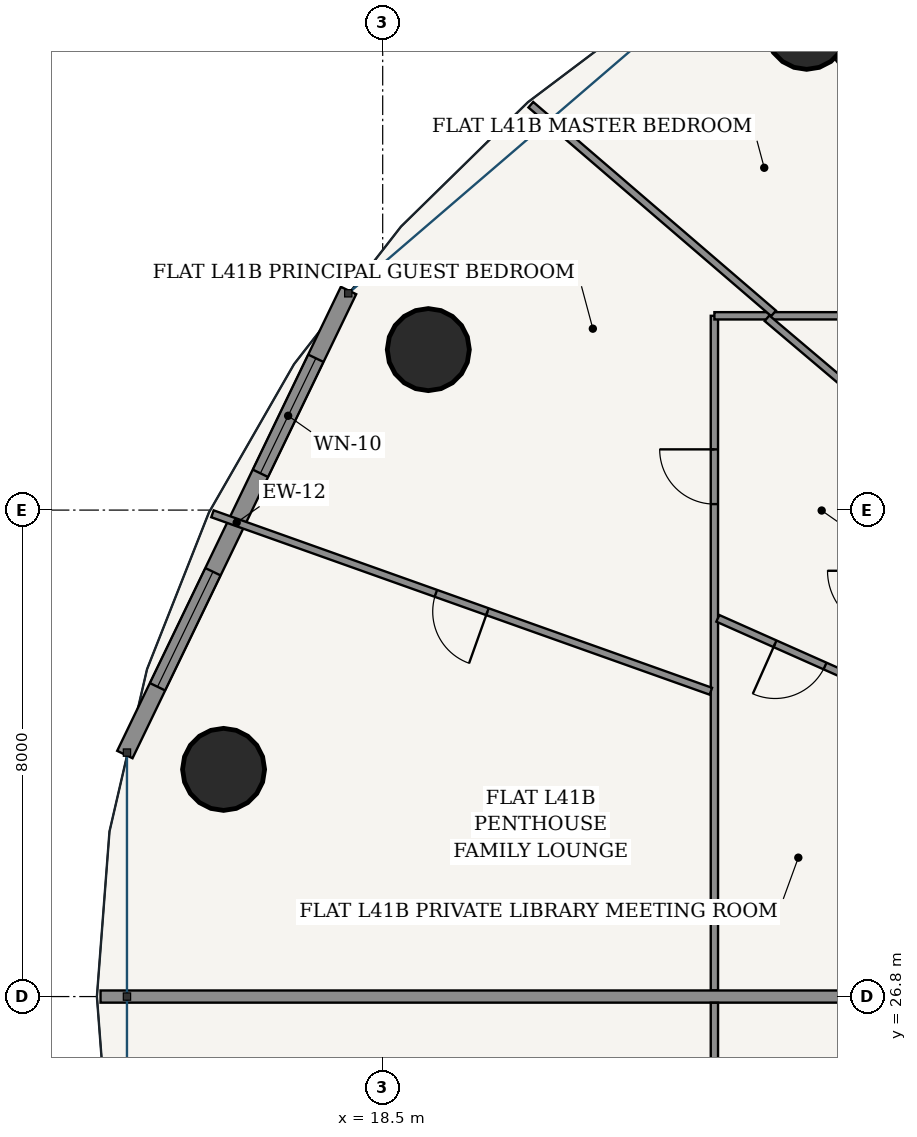
"""IFC4 building model, lengths in metres.
Left out: names, types, materials, properties, quantities, classifications, styles, units other than length and angle.
Written with IfcOpenShell. Run it as: python <this file> out.ifc"""

import sys

from ifc_helpers import new_model, si_unit, direction, frame, frame_2d, origin, origin_2d, place, context, subcontext, project, spatial, rectangle, hollow_circle, extrude, source, transform, mapped, element, fill, save


model = new_model("IFC4")
c1 = context("Model", 3, precision=1e-05, world=origin(), true_north=direction((-0.2419218956, 0.970295726276)))
c2 = subcontext(c1, "Body", "Model", "MODEL_VIEW")
j1 = project(units=[si_unit("LENGTHUNIT", "METRE"), si_unit("PLANEANGLEUNIT", "RADIAN")], contexts=[c1])
p1 = place(None, origin())
s1 = spatial("IfcSite", under=j1, at=p1, CompositionType="ELEMENT")
p2 = place(p1, origin())
s2 = spatial("IfcBuilding", under=s1, at=p2, CompositionType="ELEMENT")
p3 = place(p2, frame((0.0, 0.0, 157.0)))
s3 = spatial("IfcBuildingStorey", under=s2, at=p3, CompositionType="ELEMENT", Elevation=157.0)
for number, where, z_axis, x_axis in (
    (1, (25.472, 42.723, 0.0), (0.0, 0.0, 1.0), (1.0, 0.0, 0.0)),
    (2, (19.25, 37.439, 0.0), (0.0, 0.0, 1.0), (1.0, 0.0, 0.0)),
    (3, (15.883, 30.536, 0.0), (0.0, 0.0, 1.0), (1.0, 0.0, 0.0)),
):
    element("IfcColumn", number, at=place(p3, frame(where, z_axis=z_axis, x_axis=x_axis)), inside=s3, PredefinedType="COLUMN", context=c2, shape_type="SweptSolid", body=[
        extrude(hollow_circle(Radius=0.675, WallThickness=0.042, at=origin_2d()), origin(), (0.0, 0.0, 1.0), 3.6),
    ])
p4 = place(p3, frame((17.938, 38.411, 0.0), z_axis=(0.0, 0.0, 1.0), x_axis=(-0.434209827226, -0.900811759437, 0.0)))
e4 = element("IfcWall", 4, at=p4, inside=s3, PredefinedType="SOLIDWALL", context=c2, shape_type="SweptSolid", body=[
    extrude(rectangle(XDim=8.472, YDim=0.28, at=frame_2d((4.236, 0.0))), origin(), (0.0, 0.0, 1.0), 3.33),
])
p5 = place(p4, frame((1.237, 0.0, 0.85)))
e5 = element("IfcOpeningElement", 5, at=p5, cuts=e4, PredefinedType="OPENING", context=c2, shape_type="SweptSolid", body=[
    extrude(rectangle(XDim=2.1, YDim=1.95, at=frame_2d((1.05, 0.975))), frame((0.0, 0.15, 0.0), z_axis=(0.0, -1.0, 0.0), x_axis=(1.0, 0.0, 0.0)), (0.0, 0.0, 1.0), 0.3),
])
p6 = place(p4, frame((5.134, 0.0, 0.85)))
e6 = element("IfcOpeningElement", 6, at=p6, cuts=e4, PredefinedType="OPENING", context=c2, shape_type="SweptSolid", body=[
    extrude(rectangle(XDim=2.1, YDim=1.95, at=frame_2d((1.05, 0.975))), frame((0.0, 0.15, 0.0), z_axis=(0.0, -1.0, 0.0), x_axis=(1.0, 0.0, 0.0)), (0.0, 0.0, 1.0), 0.3),
])
p7 = place(p3, frame((23.955, 26.902, 0.0), z_axis=(0.0, 0.0, 1.0), x_axis=(0.0, 1.0, 0.0)))
e7 = element("IfcWall", 7, at=p7, inside=s3, PredefinedType="PARTITIONING", context=c2, shape_type="SweptSolid", body=[
    extrude(rectangle(XDim=11.093, YDim=0.12, at=frame_2d((5.546, 0.0))), origin(), (0.0, 0.0, 1.0), 2.776),
])
p8 = place(p7, frame((7.997, 0.0, 0.0)))
e8 = element("IfcOpeningElement", 8, at=p8, cuts=e7, PredefinedType="OPENING", context=c2, shape_type="SweptSolid", body=[
    extrude(rectangle(XDim=0.9, YDim=2.15, at=frame_2d((0.45, 1.075))), frame((0.0, 0.07, 0.0), z_axis=(0.0, -1.0, 0.0), x_axis=(1.0, 0.0, 0.0)), (0.0, 0.0, 1.0), 0.14),
])
p9 = place(p3, frame((23.955, 37.995, 0.0), z_axis=(0.0, 0.0, 1.0), x_axis=(1.0, 0.0, 0.0)))
e9 = element("IfcWall", 9, at=p9, inside=s3, PredefinedType="PARTITIONING", context=c2, shape_type="SweptSolid", body=[
    extrude(rectangle(XDim=7.69, YDim=0.12, at=frame_2d((3.845, 0.0))), origin(), (0.0, 0.0, 1.0), 2.776),
])
p10 = place(p9, frame((2.667, 0.0, 0.0)))
e10 = element("IfcOpeningElement", 10, at=p10, cuts=e9, PredefinedType="OPENING", context=c2, shape_type="SweptSolid", body=[
    extrude(rectangle(XDim=0.9, YDim=2.15, at=frame_2d((0.45, 1.075))), frame((0.0, 0.07, 0.0), z_axis=(0.0, -1.0, 0.0), x_axis=(1.0, 0.0, 0.0)), (0.0, 0.0, 1.0), 0.14),
])
p11 = place(p3, frame((29.259, 38.044, 0.0), z_axis=(0.0, 0.0, 1.0), x_axis=(-0.613770587295, 0.789484430607, 0.0)))
e11 = element("IfcWall", 11, at=p11, inside=s3, PredefinedType="PARTITIONING", context=c2, shape_type="SweptSolid", body=[
    extrude(rectangle(XDim=7.556, YDim=0.12, at=frame_2d((3.778, 0.0))), origin(), (0.0, 0.0, 1.0), 2.776),
])
p12 = place(p11, frame((2.33, 0.0, 0.0)))
e12 = element("IfcOpeningElement", 12, at=p12, cuts=e11, PredefinedType="OPENING", context=c2, shape_type="SweptSolid", body=[
    extrude(rectangle(XDim=0.9, YDim=2.15, at=frame_2d((0.45, 1.075))), frame((0.0, 0.07, 0.0), z_axis=(0.0, -1.0, 0.0), x_axis=(1.0, 0.0, 0.0)), (0.0, 0.0, 1.0), 0.14),
])
p13 = place(p3, frame((24.928, 38.035, 0.0), z_axis=(0.0, 0.0, 1.0), x_axis=(-0.758368609512, 0.65182593697, 0.0)))
e13 = element("IfcWall", 13, at=p13, inside=s3, PredefinedType="PARTITIONING", context=c2, shape_type="SweptSolid", body=[
    extrude(rectangle(XDim=5.263, YDim=0.12, at=frame_2d((2.632, 0.0))), origin(), (0.0, 0.0, 1.0), 2.846),
])
p14 = place(p3, frame((23.896, 31.821, 0.0), z_axis=(0.0, 0.0, 1.0), x_axis=(-0.942072876428, 0.335408251983, 0.0)))
e14 = element("IfcWall", 14, at=p14, inside=s3, PredefinedType="PARTITIONING", context=c2, shape_type="SweptSolid", body=[
    extrude(rectangle(XDim=8.7, YDim=0.12, at=frame_2d((4.35, 0.0))), origin(), (0.0, 0.0, 1.0), 2.846),
])
p15 = place(p14, frame((3.9, 0.0, 0.0)))
e15 = element("IfcOpeningElement", 15, at=p15, cuts=e14, PredefinedType="OPENING", context=c2, shape_type="SweptSolid", body=[
    extrude(rectangle(XDim=0.9, YDim=2.15, at=frame_2d((0.45, 1.075))), frame((0.0, 0.07, 0.0), z_axis=(0.0, -1.0, 0.0), x_axis=(1.0, 0.0, 0.0)), (0.0, 0.0, 1.0), 0.14),
])
p16 = place(p3, frame((28.032, 35.236, 0.0), z_axis=(0.0, 0.0, 1.0), x_axis=(-0.763324664245, 0.646015059388, 0.0)))
e16 = element("IfcWall", 16, at=p16, inside=s3, PredefinedType="PARTITIONING", context=c2, shape_type="SweptSolid", body=[
    extrude(rectangle(XDim=4.208, YDim=0.12, at=frame_2d((2.104, 0.0))), origin(), (0.0, 0.0, 1.0), 3.005),
])
p17 = place(p16, frame((1.654, 0.0, 0.0)))
e17 = element("IfcOpeningElement", 17, at=p17, cuts=e16, PredefinedType="OPENING", context=c2, shape_type="SweptSolid", body=[
    extrude(rectangle(XDim=0.9, YDim=2.15, at=frame_2d((0.45, 1.075))), frame((0.0, 0.07, 0.0), z_axis=(0.0, -1.0, 0.0), x_axis=(1.0, 0.0, 0.0)), (0.0, 0.0, 1.0), 0.14),
])
p18 = place(p3, frame((26.715, 31.818, 0.0), z_axis=(0.0, 0.0, 1.0), x_axis=(-0.91376049718, 0.406253312347, 0.0)))
e18 = element("IfcWall", 18, at=p18, inside=s3, PredefinedType="PARTITIONING", context=c2, shape_type="SweptSolid", body=[
    extrude(rectangle(XDim=2.958, YDim=0.12, at=frame_2d((1.479, 0.0))), origin(), (0.0, 0.0, 1.0), 3.33),
])
p19 = place(p18, frame((1.029, 0.0, 0.0)))
e19 = element("IfcOpeningElement", 19, at=p19, cuts=e18, PredefinedType="OPENING", context=c2, shape_type="SweptSolid", body=[
    extrude(rectangle(XDim=0.9, YDim=2.15, at=frame_2d((0.45, 1.075))), frame((0.0, 0.07, 0.0), z_axis=(0.0, -1.0, 0.0), x_axis=(1.0, 0.0, 0.0)), (0.0, 0.0, 1.0), 0.14),
])
p20 = place(p3, frame((26.715, 26.8, 0.0), z_axis=(0.0, 0.0, 1.0), x_axis=(-1.0, 0.0, 0.0)))
e20 = element("IfcWall", 20, at=p20, inside=s3, PredefinedType="PARTITIONING", context=c2, shape_type="SweptSolid", body=[
    extrude(rectangle(XDim=12.855, YDim=0.2, at=frame_2d((6.427, 0.0))), origin(), (0.0, 0.0, 1.0), 2.846),
])
p21 = place(p3, frame((23.955, 21.48, 0.0), z_axis=(0.0, 0.0, 1.0), x_axis=(0.0, 1.0, 0.0)))
e21 = element("IfcWall", 21, at=p21, inside=s3, PredefinedType="PARTITIONING", context=c2, shape_type="SweptSolid", body=[
    extrude(rectangle(XDim=5.218, YDim=0.12, at=frame_2d((2.609, 0.0))), origin(), (0.0, 0.0, 1.0), 2.776),
])
m1 = source(origin(), c2, "Body", "SweptSolid", [
    extrude(rectangle(XDim=2.1, YDim=1.95, at=frame_2d((1.05, 0.975))), frame((0.0, 0.03, 0.0), z_axis=(0.0, -1.0, 0.0), x_axis=(1.0, 0.0, 0.0)), (0.0, 0.0, 1.0), 0.06),
])
p22 = place(p5, origin())
e22 = element("IfcWindow", 22, at=p22, inside=s3, PartitioningType="SINGLE_PANEL", PredefinedType="WINDOW", context=c2, shape_type="MappedRepresentation", body=[
    mapped(m1, transform((0.0, 0.0, 0.0), scale=1.0)),
])
fill(e5, e22)
p23 = place(p6, origin())
e23 = element("IfcWindow", 23, at=p23, inside=s3, PartitioningType="SINGLE_PANEL", PredefinedType="WINDOW", context=c2, shape_type="MappedRepresentation", body=[
    mapped(m1, transform((0.0, 0.0, 0.0), scale=1.0)),
])
fill(e6, e23)
m2 = source(origin(), c2, "Body", "SweptSolid", [
    extrude(rectangle(XDim=0.9, YDim=2.15, at=frame_2d((0.45, 1.075))), frame((0.0, 0.025, 0.0), z_axis=(0.0, -1.0, 0.0), x_axis=(1.0, 0.0, 0.0)), (0.0, 0.0, 1.0), 0.05),
])
p24 = place(p19, origin())
e24 = element("IfcDoor", 24, at=p24, inside=s3, OperationType="SINGLE_SWING_RIGHT", PredefinedType="DOOR", context=c2, shape_type="MappedRepresentation", body=[
    mapped(m2, transform((0.0, 0.0, 0.0), scale=1.0)),
])
fill(e19, e24)
p25 = place(p8, origin())
e25 = element("IfcDoor", 25, at=p25, inside=s3, OperationType="SINGLE_SWING_RIGHT", PredefinedType="DOOR", context=c2, shape_type="MappedRepresentation", body=[
    mapped(m2, transform((0.0, 0.0, 0.0), scale=1.0)),
])
fill(e8, e25)
p26 = place(p15, origin())
e26 = element("IfcDoor", 26, at=p26, inside=s3, OperationType="SINGLE_SWING_LEFT", PredefinedType="DOOR", context=c2, shape_type="MappedRepresentation", body=[
    mapped(m2, transform((0.0, 0.0, 0.0), scale=1.0)),
])
fill(e15, e26)
save(model, sys.argv[1])
